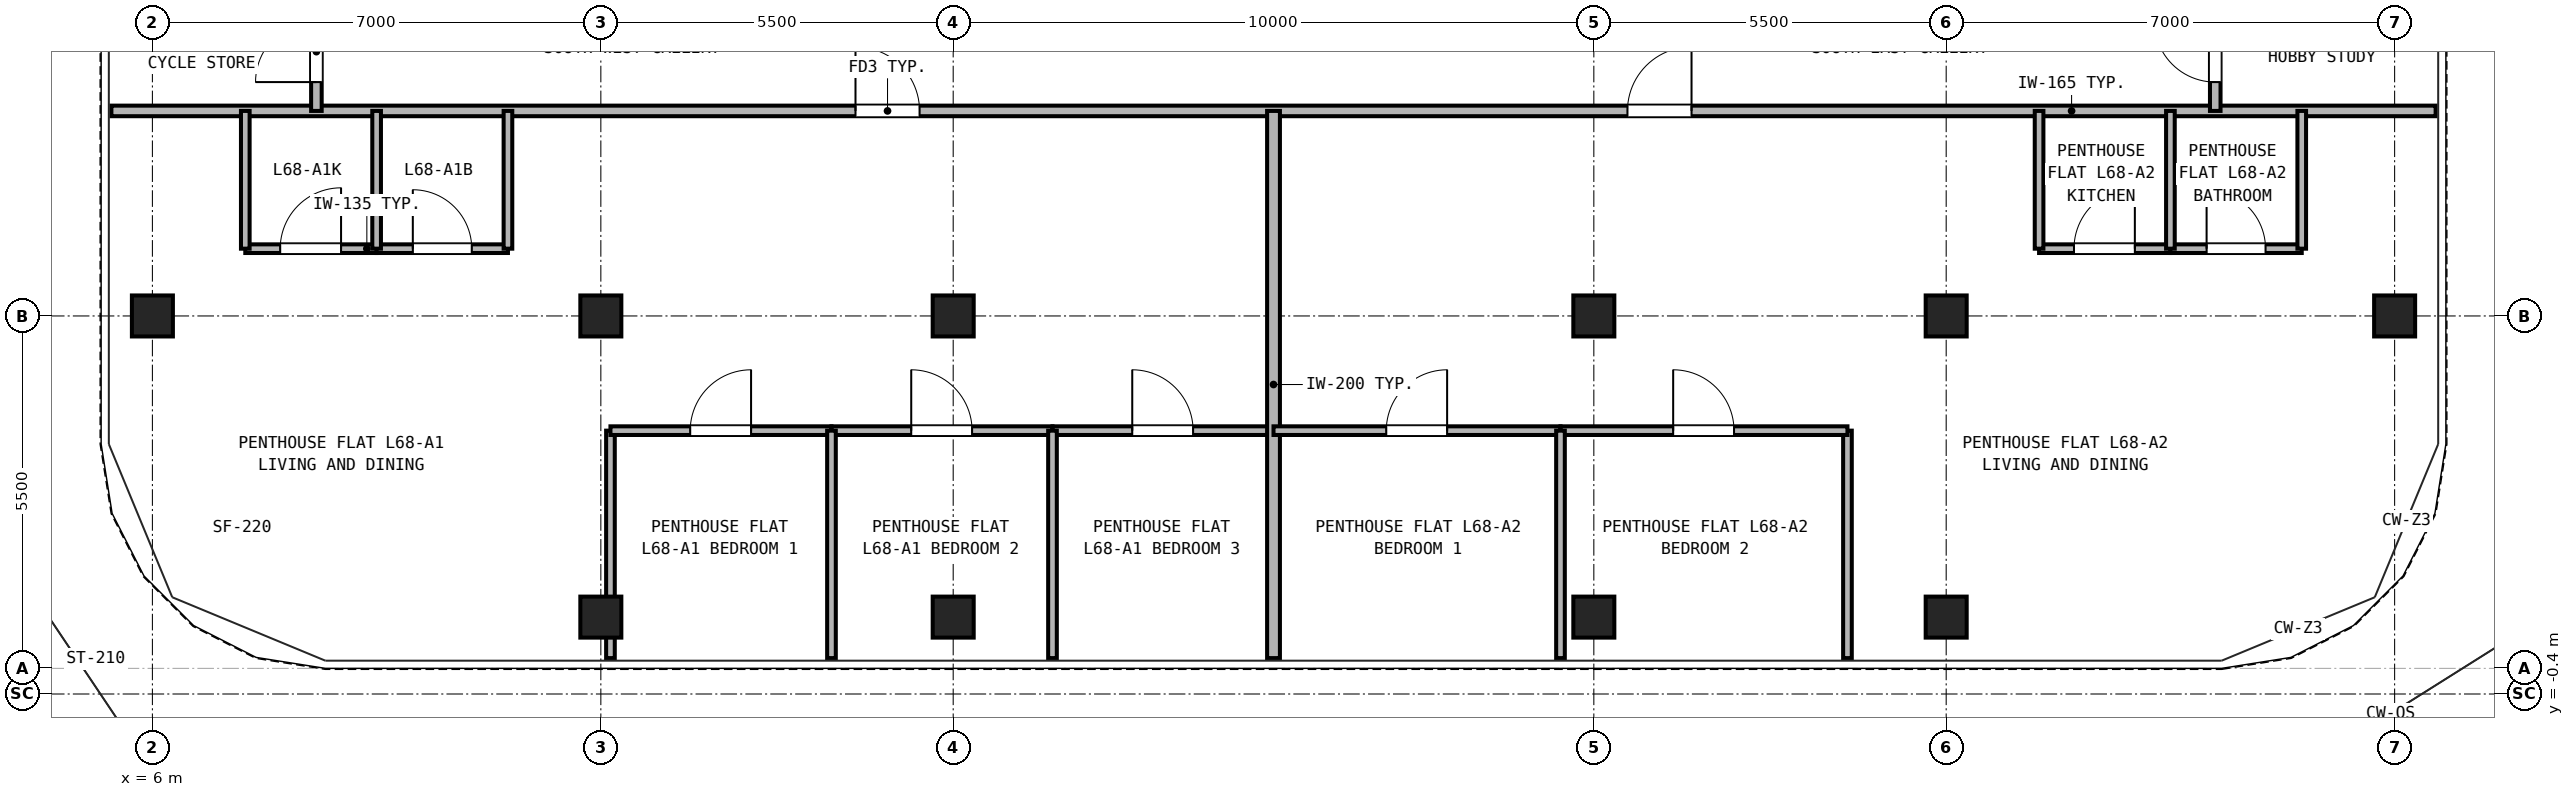
"""IFC4 building model, lengths in metres.
Left out: names, types, materials, properties, quantities, classifications, styles, units other than length and angle.
Written with IfcOpenShell. Run it as: python <this file> out.ifc"""

import sys

from ifc_helpers import new_model, si_unit, direction, frame, frame_2d, origin, origin_2d, place, context, subcontext, project, spatial, rectangle, hollow_rectangle, extrude, source, transform, mapped, element, fill, save


model = new_model("IFC4")
c1 = context("Model", 3, precision=1e-05, world=origin(), true_north=direction((0.0, 1.0)))
c2 = subcontext(c1, "Body", "Model", "MODEL_VIEW")
j1 = project(units=[si_unit("LENGTHUNIT", "METRE"), si_unit("PLANEANGLEUNIT", "RADIAN")], contexts=[c1])
p1 = place(None, origin())
s1 = spatial("IfcSite", under=j1, at=p1, CompositionType="ELEMENT")
p2 = place(p1, origin())
s2 = spatial("IfcBuilding", under=s1, at=p2, CompositionType="ELEMENT")
p3 = place(p2, frame((0.0, 0.0, 239.3)))
s3 = spatial("IfcBuildingStorey", under=s2, at=p3, CompositionType="ELEMENT", Elevation=239.3)
m1 = source(origin(), c2, "Body", "SweptSolid", [
    extrude(hollow_rectangle(XDim=0.64, YDim=0.64, WallThickness=0.035, at=origin_2d()), origin(), (0.0, 0.0, 1.0), 2.98),
])
for number, where, z_axis, x_axis in (
    (1, (13.0, 0.8, 0.0), (0.0, 0.0, 1.0), (1.0, 0.0, 0.0)),
    (2, (18.5, 0.8, 0.0), (0.0, 0.0, 1.0), (1.0, 0.0, 0.0)),
    (3, (28.5, 0.8, 0.0), (0.0, 0.0, 1.0), (1.0, 0.0, 0.0)),
    (4, (34.0, 0.8, 0.0), (0.0, 0.0, 1.0), (1.0, 0.0, 0.0)),
    (5, (6.0, 5.5, 0.0), (0.0, 0.0, 1.0), (1.0, 0.0, 0.0)),
    (6, (41.0, 5.5, 0.0), (0.0, 0.0, 1.0), (1.0, 0.0, 0.0)),
    (7, (13.0, 5.5, 0.0), (0.0, 0.0, 1.0), (1.0, 0.0, 0.0)),
    (8, (18.5, 5.5, 0.0), (0.0, 0.0, 1.0), (1.0, 0.0, 0.0)),
    (9, (28.5, 5.5, 0.0), (0.0, 0.0, 1.0), (1.0, 0.0, 0.0)),
    (10, (34.0, 5.5, 0.0), (0.0, 0.0, 1.0), (1.0, 0.0, 0.0)),
):
    element("IfcColumn", number, at=place(p3, frame(where, z_axis=z_axis, x_axis=x_axis)), inside=s3, PredefinedType="COLUMN", context=c2, shape_type="MappedRepresentation", body=[
        mapped(m1, transform((0.0, 0.0, 0.0), x_axis=(1.0, 0.0, 0.0), y_axis=(0.0, 1.0, 0.0), z_axis=(0.0, 0.0, 1.0), scale=1.0)),
    ])
p4 = place(p3, frame((5.36, 8.7, 0.0), z_axis=(0.0, 0.0, 1.0), x_axis=(1.0, 0.0, 0.0)))
e11 = element("IfcWall", 11, at=p4, inside=s3, PredefinedType="PARTITIONING", context=c2, shape_type="SweptSolid", body=[
    extrude(rectangle(XDim=36.28, YDim=0.165, at=frame_2d((18.14, 0.0))), origin(), (0.0, 0.0, 1.0), 2.655),
])
p5 = place(p4, frame((11.615, 0.0, 0.0)))
e12 = element("IfcOpeningElement", 12, at=p5, cuts=e11, PredefinedType="OPENING", context=c2, shape_type="SweptSolid", body=[
    extrude(rectangle(XDim=1.0, YDim=2.15, at=frame_2d((0.5, 1.075))), frame((0.0, 0.093, 0.0), z_axis=(0.0, -1.0, 0.0), x_axis=(1.0, 0.0, 0.0)), (0.0, 0.0, 1.0), 0.185),
])
p6 = place(p4, frame((23.665, 0.0, 0.0)))
e13 = element("IfcOpeningElement", 13, at=p6, cuts=e11, PredefinedType="OPENING", context=c2, shape_type="SweptSolid", body=[
    extrude(rectangle(XDim=1.0, YDim=2.15, at=frame_2d((0.5, 1.075))), frame((0.0, 0.093, 0.0), z_axis=(0.0, -1.0, 0.0), x_axis=(1.0, 0.0, 0.0)), (0.0, 0.0, 1.0), 0.185),
])
p7 = place(p3, frame((8.56, 8.7, 0.0), z_axis=(0.0, 0.0, 1.0), x_axis=(0.0, 1.0, 0.0)))
e14 = element("IfcWall", 14, at=p7, inside=s3, PredefinedType="PARTITIONING", context=c2, shape_type="SweptSolid", body=[
    extrude(rectangle(XDim=2.0, YDim=0.165, at=frame_2d((1.0, 0.0))), origin(), (0.0, 0.0, 1.0), 2.98),
])
p8 = place(p7, frame((0.45, 0.0, 0.0)))
e15 = element("IfcOpeningElement", 15, at=p8, cuts=e14, PredefinedType="OPENING", context=c2, shape_type="SweptSolid", body=[
    extrude(rectangle(XDim=0.95, YDim=2.15, at=frame_2d((0.475, 1.075))), frame((0.0, 0.093, 0.0), z_axis=(0.0, -1.0, 0.0), x_axis=(1.0, 0.0, 0.0)), (0.0, 0.0, 1.0), 0.185),
])
p9 = place(p3, frame((38.2, 8.7, 0.0), z_axis=(0.0, 0.0, 1.0), x_axis=(0.0, 1.0, 0.0)))
e16 = element("IfcWall", 16, at=p9, inside=s3, PredefinedType="PARTITIONING", context=c2, shape_type="SweptSolid", body=[
    extrude(rectangle(XDim=2.0, YDim=0.165, at=frame_2d((1.0, 0.0))), origin(), (0.0, 0.0, 1.0), 2.98),
])
p10 = place(p9, frame((0.45, 0.0, 0.0)))
e17 = element("IfcOpeningElement", 17, at=p10, cuts=e16, PredefinedType="OPENING", context=c2, shape_type="SweptSolid", body=[
    extrude(rectangle(XDim=0.95, YDim=2.15, at=frame_2d((0.475, 1.075))), frame((0.0, 0.093, 0.0), z_axis=(0.0, -1.0, 0.0), x_axis=(1.0, 0.0, 0.0)), (0.0, 0.0, 1.0), 0.185),
])
p11 = place(p3, frame((7.45, 6.55, 0.0), z_axis=(0.0, 0.0, 1.0), x_axis=(1.0, 0.0, 0.0)))
e18 = element("IfcWall", 18, at=p11, inside=s3, PredefinedType="PARTITIONING", context=c2, shape_type="SweptSolid", body=[
    extrude(rectangle(XDim=2.05, YDim=0.135, at=frame_2d((1.025, 0.0))), origin(), (0.0, 0.0, 1.0), 2.98),
])
p12 = place(p11, frame((0.545, 0.0, 0.0)))
e19 = element("IfcOpeningElement", 19, at=p12, cuts=e18, PredefinedType="OPENING", context=c2, shape_type="SweptSolid", body=[
    extrude(rectangle(XDim=0.95, YDim=2.15, at=frame_2d((0.475, 1.075))), frame((0.0, 0.077, 0.0), z_axis=(0.0, -1.0, 0.0), x_axis=(1.0, 0.0, 0.0)), (0.0, 0.0, 1.0), 0.155),
])
p13 = place(p3, frame((9.5, 6.55, 0.0), z_axis=(0.0, 0.0, 1.0), x_axis=(1.0, 0.0, 0.0)))
e20 = element("IfcWall", 20, at=p13, inside=s3, PredefinedType="PARTITIONING", context=c2, shape_type="SweptSolid", body=[
    extrude(rectangle(XDim=2.05, YDim=0.135, at=frame_2d((1.025, 0.0))), origin(), (0.0, 0.0, 1.0), 2.98),
])
p14 = place(p13, frame((0.565, 0.0, 0.0)))
e21 = element("IfcOpeningElement", 21, at=p14, cuts=e20, PredefinedType="OPENING", context=c2, shape_type="SweptSolid", body=[
    extrude(rectangle(XDim=0.92, YDim=2.1, at=frame_2d((0.46, 1.05))), frame((0.0, 0.077, 0.0), z_axis=(0.0, -1.0, 0.0), x_axis=(1.0, 0.0, 0.0)), (0.0, 0.0, 1.0), 0.155),
])
for number, where, z_axis, x_axis in (
    (22, (7.45, 6.55, 0.0), (0.0, 0.0, 1.0), (0.0, 1.0, 0.0)),
    (23, (9.5, 6.55, 0.0), (0.0, 0.0, 1.0), (0.0, 1.0, 0.0)),
    (24, (11.55, 6.55, 0.0), (0.0, 0.0, 1.0), (0.0, 1.0, 0.0)),
):
    element("IfcWall", number, at=place(p3, frame(where, z_axis=z_axis, x_axis=x_axis)), inside=s3, PredefinedType="PARTITIONING", context=c2, shape_type="SweptSolid", body=[
        extrude(rectangle(XDim=2.15, YDim=0.135, at=frame_2d((1.075, 0.0))), origin(), (0.0, 0.0, 1.0), 2.98),
    ])
p15 = place(p3, frame((13.15, 0.16, 0.0), z_axis=(0.0, 0.0, 1.0), x_axis=(0.0, 1.0, 0.0)))
e25 = element("IfcWall", 25, at=p15, inside=s3, PredefinedType="PARTITIONING", context=c2, shape_type="SweptSolid", body=[
    extrude(rectangle(XDim=3.55, YDim=0.135, at=frame_2d((1.775, 0.0))), origin(), (0.0, 0.0, 1.0), 2.428),
])
p16 = place(p3, frame((13.15, 3.71, 0.0), z_axis=(0.0, 0.0, 1.0), x_axis=(1.0, 0.0, 0.0)))
e26 = element("IfcWall", 26, at=p16, inside=s3, PredefinedType="PARTITIONING", context=c2, shape_type="SweptSolid", body=[
    extrude(rectangle(XDim=3.45, YDim=0.135, at=frame_2d((1.725, 0.0))), origin(), (0.0, 0.0, 1.0), 2.98),
])
p17 = place(p16, frame((1.245, 0.0, 0.0)))
e27 = element("IfcOpeningElement", 27, at=p17, cuts=e26, PredefinedType="OPENING", context=c2, shape_type="SweptSolid", body=[
    extrude(rectangle(XDim=0.95, YDim=2.15, at=frame_2d((0.475, 1.075))), frame((0.0, 0.077, 0.0), z_axis=(0.0, -1.0, 0.0), x_axis=(1.0, 0.0, 0.0)), (0.0, 0.0, 1.0), 0.155),
])
p18 = place(p3, frame((16.6, 3.71, 0.0), z_axis=(0.0, 0.0, 1.0), x_axis=(1.0, 0.0, 0.0)))
e28 = element("IfcWall", 28, at=p18, inside=s3, PredefinedType="PARTITIONING", context=c2, shape_type="SweptSolid", body=[
    extrude(rectangle(XDim=3.45, YDim=0.135, at=frame_2d((1.725, 0.0))), origin(), (0.0, 0.0, 1.0), 2.98),
])
p19 = place(p18, frame((1.245, 0.0, 0.0)))
e29 = element("IfcOpeningElement", 29, at=p19, cuts=e28, PredefinedType="OPENING", context=c2, shape_type="SweptSolid", body=[
    extrude(rectangle(XDim=0.95, YDim=2.15, at=frame_2d((0.475, 1.075))), frame((0.0, 0.077, 0.0), z_axis=(0.0, -1.0, 0.0), x_axis=(1.0, 0.0, 0.0)), (0.0, 0.0, 1.0), 0.155),
])
p20 = place(p3, frame((16.6, 0.16, 0.0), z_axis=(0.0, 0.0, 1.0), x_axis=(0.0, 1.0, 0.0)))
e30 = element("IfcWall", 30, at=p20, inside=s3, PredefinedType="PARTITIONING", context=c2, shape_type="SweptSolid", body=[
    extrude(rectangle(XDim=3.55, YDim=0.135, at=frame_2d((1.775, 0.0))), origin(), (0.0, 0.0, 1.0), 2.98),
])
p21 = place(p3, frame((20.05, 3.71, 0.0), z_axis=(0.0, 0.0, 1.0), x_axis=(1.0, 0.0, 0.0)))
e31 = element("IfcWall", 31, at=p21, inside=s3, PredefinedType="PARTITIONING", context=c2, shape_type="SweptSolid", body=[
    extrude(rectangle(XDim=3.45, YDim=0.135, at=frame_2d((1.725, 0.0))), origin(), (0.0, 0.0, 1.0), 2.98),
])
p22 = place(p21, frame((1.245, 0.0, 0.0)))
e32 = element("IfcOpeningElement", 32, at=p22, cuts=e31, PredefinedType="OPENING", context=c2, shape_type="SweptSolid", body=[
    extrude(rectangle(XDim=0.95, YDim=2.15, at=frame_2d((0.475, 1.075))), frame((0.0, 0.077, 0.0), z_axis=(0.0, -1.0, 0.0), x_axis=(1.0, 0.0, 0.0)), (0.0, 0.0, 1.0), 0.155),
])
p23 = place(p3, frame((20.05, 0.16, 0.0), z_axis=(0.0, 0.0, 1.0), x_axis=(0.0, 1.0, 0.0)))
e33 = element("IfcWall", 33, at=p23, inside=s3, PredefinedType="PARTITIONING", context=c2, shape_type="SweptSolid", body=[
    extrude(rectangle(XDim=3.55, YDim=0.135, at=frame_2d((1.775, 0.0))), origin(), (0.0, 0.0, 1.0), 2.98),
])
p24 = place(p3, frame((23.5, 0.16, 0.0), z_axis=(0.0, 0.0, 1.0), x_axis=(0.0, 1.0, 0.0)))
e34 = element("IfcWall", 34, at=p24, inside=s3, PredefinedType="PARTITIONING", context=c2, shape_type="SweptSolid", body=[
    extrude(rectangle(XDim=8.54, YDim=0.2, at=frame_2d((4.27, 0.0))), origin(), (0.0, 0.0, 1.0), 2.98),
])
p25 = place(p3, frame((35.45, 6.55, 0.0), z_axis=(0.0, 0.0, 1.0), x_axis=(1.0, 0.0, 0.0)))
e35 = element("IfcWall", 35, at=p25, inside=s3, PredefinedType="PARTITIONING", context=c2, shape_type="SweptSolid", body=[
    extrude(rectangle(XDim=2.05, YDim=0.135, at=frame_2d((1.025, 0.0))), origin(), (0.0, 0.0, 1.0), 2.98),
])
p26 = place(p25, frame((0.545, 0.0, 0.0)))
e36 = element("IfcOpeningElement", 36, at=p26, cuts=e35, PredefinedType="OPENING", context=c2, shape_type="SweptSolid", body=[
    extrude(rectangle(XDim=0.95, YDim=2.15, at=frame_2d((0.475, 1.075))), frame((0.0, 0.077, 0.0), z_axis=(0.0, -1.0, 0.0), x_axis=(1.0, 0.0, 0.0)), (0.0, 0.0, 1.0), 0.155),
])
p27 = place(p3, frame((37.5, 6.55, 0.0), z_axis=(0.0, 0.0, 1.0), x_axis=(1.0, 0.0, 0.0)))
e37 = element("IfcWall", 37, at=p27, inside=s3, PredefinedType="PARTITIONING", context=c2, shape_type="SweptSolid", body=[
    extrude(rectangle(XDim=2.05, YDim=0.135, at=frame_2d((1.025, 0.0))), origin(), (0.0, 0.0, 1.0), 2.98),
])
p28 = place(p27, frame((0.565, 0.0, 0.0)))
e38 = element("IfcOpeningElement", 38, at=p28, cuts=e37, PredefinedType="OPENING", context=c2, shape_type="SweptSolid", body=[
    extrude(rectangle(XDim=0.92, YDim=2.1, at=frame_2d((0.46, 1.05))), frame((0.0, 0.077, 0.0), z_axis=(0.0, -1.0, 0.0), x_axis=(1.0, 0.0, 0.0)), (0.0, 0.0, 1.0), 0.155),
])
for number, where, z_axis, x_axis in (
    (39, (35.45, 6.55, 0.0), (0.0, 0.0, 1.0), (0.0, 1.0, 0.0)),
    (40, (37.5, 6.55, 0.0), (0.0, 0.0, 1.0), (0.0, 1.0, 0.0)),
    (41, (39.55, 6.55, 0.0), (0.0, 0.0, 1.0), (0.0, 1.0, 0.0)),
):
    element("IfcWall", number, at=place(p3, frame(where, z_axis=z_axis, x_axis=x_axis)), inside=s3, PredefinedType="PARTITIONING", context=c2, shape_type="SweptSolid", body=[
        extrude(rectangle(XDim=2.15, YDim=0.135, at=frame_2d((1.075, 0.0))), origin(), (0.0, 0.0, 1.0), 2.98),
    ])
p29 = place(p3, frame((32.459, 0.16, 0.0), z_axis=(0.0, 0.0, 1.0), x_axis=(0.0, 1.0, 0.0)))
e42 = element("IfcWall", 42, at=p29, inside=s3, PredefinedType="PARTITIONING", context=c2, shape_type="SweptSolid", body=[
    extrude(rectangle(XDim=3.55, YDim=0.135, at=frame_2d((1.775, 0.0))), origin(), (0.0, 0.0, 1.0), 2.98),
])
p30 = place(p3, frame((23.5, 3.71, 0.0), z_axis=(0.0, 0.0, 1.0), x_axis=(1.0, 0.0, 0.0)))
e43 = element("IfcWall", 43, at=p30, inside=s3, PredefinedType="PARTITIONING", context=c2, shape_type="SweptSolid", body=[
    extrude(rectangle(XDim=4.479, YDim=0.135, at=frame_2d((2.24, 0.0))), origin(), (0.0, 0.0, 1.0), 2.98),
])
p31 = place(p30, frame((1.76, 0.0, 0.0)))
e44 = element("IfcOpeningElement", 44, at=p31, cuts=e43, PredefinedType="OPENING", context=c2, shape_type="SweptSolid", body=[
    extrude(rectangle(XDim=0.95, YDim=2.15, at=frame_2d((0.475, 1.075))), frame((0.0, 0.077, 0.0), z_axis=(0.0, -1.0, 0.0), x_axis=(1.0, 0.0, 0.0)), (0.0, 0.0, 1.0), 0.155),
])
p32 = place(p3, frame((27.979, 3.71, 0.0), z_axis=(0.0, 0.0, 1.0), x_axis=(1.0, 0.0, 0.0)))
e45 = element("IfcWall", 45, at=p32, inside=s3, PredefinedType="PARTITIONING", context=c2, shape_type="SweptSolid", body=[
    extrude(rectangle(XDim=4.479, YDim=0.135, at=frame_2d((2.24, 0.0))), origin(), (0.0, 0.0, 1.0), 2.98),
])
p33 = place(p32, frame((1.759, 0.0, 0.0)))
e46 = element("IfcOpeningElement", 46, at=p33, cuts=e45, PredefinedType="OPENING", context=c2, shape_type="SweptSolid", body=[
    extrude(rectangle(XDim=0.95, YDim=2.15, at=frame_2d((0.475, 1.075))), frame((0.0, 0.077, 0.0), z_axis=(0.0, -1.0, 0.0), x_axis=(1.0, 0.0, 0.0)), (0.0, 0.0, 1.0), 0.155),
])
p34 = place(p3, frame((27.979, 0.16, 0.0), z_axis=(0.0, 0.0, 1.0), x_axis=(0.0, 1.0, 0.0)))
e47 = element("IfcWall", 47, at=p34, inside=s3, PredefinedType="PARTITIONING", context=c2, shape_type="SweptSolid", body=[
    extrude(rectangle(XDim=3.55, YDim=0.135, at=frame_2d((1.775, 0.0))), origin(), (0.0, 0.0, 1.0), 2.98),
])
p35 = place(p12, origin())
e48 = element("IfcDoor", 48, at=p35, inside=s3, OperationType="SINGLE_SWING_RIGHT", PredefinedType="DOOR", context=c2, shape_type="SweptSolid", body=[
    extrude(rectangle(XDim=0.95, YDim=2.15, at=frame_2d((0.475, 1.075))), frame((0.0, 0.025, 0.0), z_axis=(0.0, -1.0, 0.0), x_axis=(1.0, 0.0, 0.0)), (0.0, 0.0, 1.0), 0.05),
])
fill(e19, e48)
p36 = place(p14, origin())
e49 = element("IfcDoor", 49, at=p36, inside=s3, OperationType="SINGLE_SWING_LEFT", PredefinedType="DOOR", context=c2, shape_type="SweptSolid", body=[
    extrude(rectangle(XDim=0.92, YDim=2.1, at=frame_2d((0.46, 1.05))), frame((0.0, 0.025, 0.0), z_axis=(0.0, -1.0, 0.0), x_axis=(1.0, 0.0, 0.0)), (0.0, 0.0, 1.0), 0.05),
])
fill(e21, e49)
p37 = place(p17, frame((0.95, 0.0, 0.0), z_axis=(0.0, 0.0, 1.0), x_axis=(-1.0, 0.0, 0.0)))
e50 = element("IfcDoor", 50, at=p37, inside=s3, OperationType="SINGLE_SWING_RIGHT", PredefinedType="DOOR", context=c2, shape_type="SweptSolid", body=[
    extrude(rectangle(XDim=0.95, YDim=2.15, at=frame_2d((0.475, 1.075))), frame((0.0, 0.025, 0.0), z_axis=(0.0, -1.0, 0.0), x_axis=(1.0, 0.0, 0.0)), (0.0, 0.0, 1.0), 0.05),
])
fill(e27, e50)
p38 = place(p19, frame((0.95, 0.0, 0.0), z_axis=(0.0, 0.0, 1.0), x_axis=(-1.0, 0.0, 0.0)))
e51 = element("IfcDoor", 51, at=p38, inside=s3, OperationType="SINGLE_SWING_LEFT", PredefinedType="DOOR", context=c2, shape_type="SweptSolid", body=[
    extrude(rectangle(XDim=0.95, YDim=2.15, at=frame_2d((0.475, 1.075))), frame((0.0, 0.025, 0.0), z_axis=(0.0, -1.0, 0.0), x_axis=(1.0, 0.0, 0.0)), (0.0, 0.0, 1.0), 0.05),
])
fill(e29, e51)
p39 = place(p22, frame((0.95, 0.0, 0.0), z_axis=(0.0, 0.0, 1.0), x_axis=(-1.0, 0.0, 0.0)))
e52 = element("IfcDoor", 52, at=p39, inside=s3, OperationType="SINGLE_SWING_LEFT", PredefinedType="DOOR", context=c2, shape_type="SweptSolid", body=[
    extrude(rectangle(XDim=0.95, YDim=2.15, at=frame_2d((0.475, 1.075))), frame((0.0, 0.025, 0.0), z_axis=(0.0, -1.0, 0.0), x_axis=(1.0, 0.0, 0.0)), (0.0, 0.0, 1.0), 0.05),
])
fill(e32, e52)
p40 = place(p5, frame((1.0, 0.0, 0.0), z_axis=(0.0, 0.0, 1.0), x_axis=(-1.0, 0.0, 0.0)))
e53 = element("IfcDoor", 53, at=p40, inside=s3, OperationType="SINGLE_SWING_LEFT", PredefinedType="DOOR", context=c2, shape_type="SweptSolid", body=[
    extrude(rectangle(XDim=1.0, YDim=2.15, at=frame_2d((0.5, 1.075))), frame((0.0, 0.025, 0.0), z_axis=(0.0, -1.0, 0.0), x_axis=(1.0, 0.0, 0.0)), (0.0, 0.0, 1.0), 0.05),
])
fill(e12, e53)
p41 = place(p26, origin())
e54 = element("IfcDoor", 54, at=p41, inside=s3, OperationType="SINGLE_SWING_RIGHT", PredefinedType="DOOR", context=c2, shape_type="SweptSolid", body=[
    extrude(rectangle(XDim=0.95, YDim=2.15, at=frame_2d((0.475, 1.075))), frame((0.0, 0.025, 0.0), z_axis=(0.0, -1.0, 0.0), x_axis=(1.0, 0.0, 0.0)), (0.0, 0.0, 1.0), 0.05),
])
fill(e36, e54)
p42 = place(p28, origin())
e55 = element("IfcDoor", 55, at=p42, inside=s3, OperationType="SINGLE_SWING_LEFT", PredefinedType="DOOR", context=c2, shape_type="SweptSolid", body=[
    extrude(rectangle(XDim=0.92, YDim=2.1, at=frame_2d((0.46, 1.05))), frame((0.0, 0.025, 0.0), z_axis=(0.0, -1.0, 0.0), x_axis=(1.0, 0.0, 0.0)), (0.0, 0.0, 1.0), 0.05),
])
fill(e38, e55)
p43 = place(p31, frame((0.95, 0.0, 0.0), z_axis=(0.0, 0.0, 1.0), x_axis=(-1.0, 0.0, 0.0)))
e56 = element("IfcDoor", 56, at=p43, inside=s3, OperationType="SINGLE_SWING_RIGHT", PredefinedType="DOOR", context=c2, shape_type="SweptSolid", body=[
    extrude(rectangle(XDim=0.95, YDim=2.15, at=frame_2d((0.475, 1.075))), frame((0.0, 0.025, 0.0), z_axis=(0.0, -1.0, 0.0), x_axis=(1.0, 0.0, 0.0)), (0.0, 0.0, 1.0), 0.05),
])
fill(e44, e56)
p44 = place(p33, frame((0.95, 0.0, 0.0), z_axis=(0.0, 0.0, 1.0), x_axis=(-1.0, 0.0, 0.0)))
e57 = element("IfcDoor", 57, at=p44, inside=s3, OperationType="SINGLE_SWING_LEFT", PredefinedType="DOOR", context=c2, shape_type="SweptSolid", body=[
    extrude(rectangle(XDim=0.95, YDim=2.15, at=frame_2d((0.475, 1.075))), frame((0.0, 0.025, 0.0), z_axis=(0.0, -1.0, 0.0), x_axis=(1.0, 0.0, 0.0)), (0.0, 0.0, 1.0), 0.05),
])
fill(e46, e57)
p45 = place(p6, frame((1.0, 0.0, 0.0), z_axis=(0.0, 0.0, 1.0), x_axis=(-1.0, 0.0, 0.0)))
e58 = element("IfcDoor", 58, at=p45, inside=s3, OperationType="SINGLE_SWING_RIGHT", PredefinedType="DOOR", context=c2, shape_type="SweptSolid", body=[
    extrude(rectangle(XDim=1.0, YDim=2.15, at=frame_2d((0.5, 1.075))), frame((0.0, 0.025, 0.0), z_axis=(0.0, -1.0, 0.0), x_axis=(1.0, 0.0, 0.0)), (0.0, 0.0, 1.0), 0.05),
])
fill(e13, e58)
p46 = place(p8, frame((0.95, 0.0, 0.0), z_axis=(0.0, 0.0, 1.0), x_axis=(-1.0, 0.0, 0.0)))
e59 = element("IfcDoor", 59, at=p46, inside=s3, OperationType="SINGLE_SWING_LEFT", PredefinedType="DOOR", context=c2, shape_type="SweptSolid", body=[
    extrude(rectangle(XDim=0.95, YDim=2.15, at=frame_2d((0.475, 1.075))), frame((0.0, 0.025, 0.0), z_axis=(0.0, -1.0, 0.0), x_axis=(1.0, 0.0, 0.0)), (0.0, 0.0, 1.0), 0.05),
])
fill(e15, e59)
p47 = place(p10, origin())
e60 = element("IfcDoor", 60, at=p47, inside=s3, OperationType="SINGLE_SWING_RIGHT", PredefinedType="DOOR", context=c2, shape_type="SweptSolid", body=[
    extrude(rectangle(XDim=0.95, YDim=2.15, at=frame_2d((0.475, 1.075))), frame((0.0, 0.025, 0.0), z_axis=(0.0, -1.0, 0.0), x_axis=(1.0, 0.0, 0.0)), (0.0, 0.0, 1.0), 0.05),
])
fill(e17, e60)
save(model, sys.argv[1])
